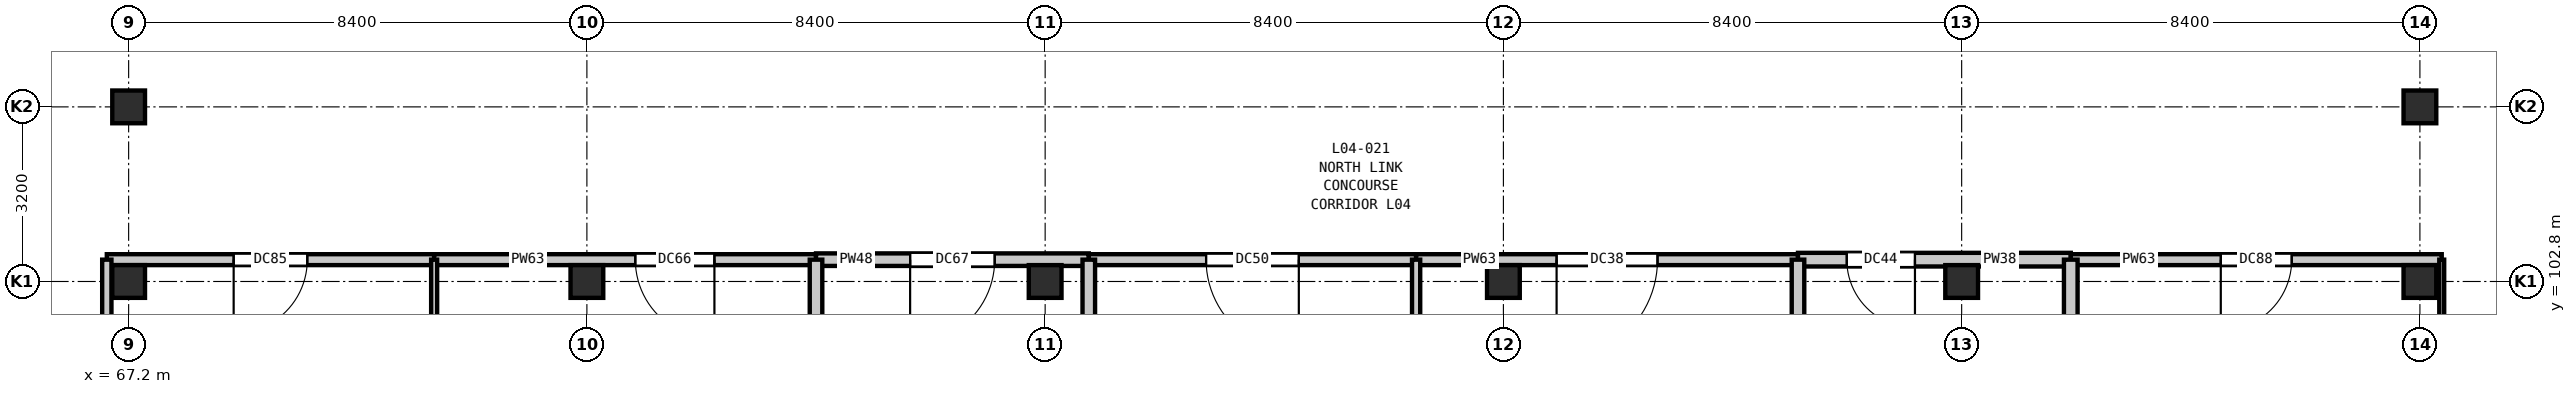
"""IFC4 building model, lengths in metres.
Left out: names, types, materials, properties, quantities, classifications, styles, units other than length and angle.
Written with IfcOpenShell. Run it as: python <this file> out.ifc"""

import sys

from ifc_helpers import new_model, si_unit, direction, frame, frame_2d, origin, origin_2d, place, context, subcontext, project, spatial, rectangle, extrude, element, fill, save


model = new_model("IFC4")
c1 = context("Model", 3, precision=1e-05, world=origin(), true_north=direction((0.0, 1.0)))
c2 = subcontext(c1, "Body", "Model", "MODEL_VIEW")
j1 = project(units=[si_unit("LENGTHUNIT", "METRE"), si_unit("PLANEANGLEUNIT", "RADIAN")], contexts=[c1])
p1 = place(None, origin())
s1 = spatial("IfcSite", under=j1, at=p1, CompositionType="ELEMENT")
p2 = place(p1, origin())
s2 = spatial("IfcBuilding", under=s1, at=p2, CompositionType="ELEMENT")
p3 = place(p2, frame((0.0, 0.0, 20.4)))
s3 = spatial("IfcBuildingStorey", under=s2, at=p3, CompositionType="ELEMENT", Elevation=20.4)
for number, where, z_axis, x_axis in (
    (1, (67.2, 102.8, 0.0), (0.0, 0.0, 1.0), (1.0, 0.0, 0.0)),
    (2, (67.2, 106.0, 0.0), (0.0, 0.0, 1.0), (1.0, 0.0, 0.0)),
    (3, (75.6, 102.8, 0.0), (0.0, 0.0, 1.0), (1.0, 0.0, 0.0)),
    (4, (84.0, 102.8, 0.0), (0.0, 0.0, 1.0), (1.0, 0.0, 0.0)),
    (5, (92.4, 102.8, 0.0), (0.0, 0.0, 1.0), (1.0, 0.0, 0.0)),
    (6, (100.8, 102.8, 0.0), (0.0, 0.0, 1.0), (1.0, 0.0, 0.0)),
    (7, (109.2, 102.8, 0.0), (0.0, 0.0, 1.0), (1.0, 0.0, 0.0)),
    (8, (109.2, 106.0, 0.0), (0.0, 0.0, 1.0), (1.0, 0.0, 0.0)),
):
    element("IfcColumn", number, at=place(p3, frame(where, z_axis=z_axis, x_axis=x_axis)), inside=s3, PredefinedType="COLUMN", context=c2, shape_type="SweptSolid", body=[
        extrude(rectangle(XDim=0.6, YDim=0.6, at=origin_2d()), origin(), (0.0, 0.0, 1.0), 4.2),
    ])
p4 = place(p3, frame((66.8, 103.2, 0.0), z_axis=(0.0, 0.0, 1.0), x_axis=(1.0, 0.0, 0.0)))
e9 = element("IfcWall", 9, at=p4, inside=s3, PredefinedType="PARTITIONING", context=c2, shape_type="SweptSolid", body=[
    extrude(rectangle(XDim=6.0, YDim=0.2, at=frame_2d((3.0, 0.0))), origin(), (0.0, 0.0, 1.0), 3.82),
])
p5 = place(p4, frame((2.325, 0.0, 0.0)))
e10 = element("IfcOpeningElement", 10, at=p5, cuts=e9, PredefinedType="OPENING", context=c2, shape_type="SweptSolid", body=[
    extrude(rectangle(XDim=1.35, YDim=2.2, at=frame_2d((0.675, 1.1))), frame((0.0, 0.11, 0.0), z_axis=(0.0, -1.0, 0.0), x_axis=(1.0, 0.0, 0.0)), (0.0, 0.0, 1.0), 0.22),
])
p6 = place(p3, frame((72.8, 103.2, 0.0), z_axis=(0.0, 0.0, 1.0), x_axis=(1.0, 0.0, 0.0)))
e11 = element("IfcWall", 11, at=p6, inside=s3, PredefinedType="PARTITIONING", context=c2, shape_type="SweptSolid", body=[
    extrude(rectangle(XDim=7.0, YDim=0.2, at=frame_2d((3.5, 0.0))), origin(), (0.0, 0.0, 1.0), 3.82),
])
p7 = place(p6, frame((3.688, 0.0, 0.0)))
e12 = element("IfcOpeningElement", 12, at=p7, cuts=e11, PredefinedType="OPENING", context=c2, shape_type="SweptSolid", body=[
    extrude(rectangle(XDim=1.45, YDim=2.25, at=frame_2d((0.725, 1.125))), frame((0.0, 0.11, 0.0), z_axis=(0.0, -1.0, 0.0), x_axis=(1.0, 0.0, 0.0)), (0.0, 0.0, 1.0), 0.22),
])
p8 = place(p3, frame((79.8, 103.2, 0.0), z_axis=(0.0, 0.0, 1.0), x_axis=(1.0, 0.0, 0.0)))
e13 = element("IfcWall", 13, at=p8, inside=s3, PredefinedType="PARTITIONING", context=c2, shape_type="SweptSolid", body=[
    extrude(rectangle(XDim=5.0, YDim=0.23, at=frame_2d((2.5, 0.0))), origin(), (0.0, 0.0, 1.0), 3.82),
])
p9 = place(p8, frame((1.725, 0.0, 0.0)))
e14 = element("IfcOpeningElement", 14, at=p9, cuts=e13, PredefinedType="OPENING", context=c2, shape_type="SweptSolid", body=[
    extrude(rectangle(XDim=1.55, YDim=2.25, at=frame_2d((0.775, 1.125))), frame((0.0, 0.125, 0.0), z_axis=(0.0, -1.0, 0.0), x_axis=(1.0, 0.0, 0.0)), (0.0, 0.0, 1.0), 0.25),
])
p10 = place(p3, frame((84.8, 103.2, 0.0), z_axis=(0.0, 0.0, 1.0), x_axis=(1.0, 0.0, 0.0)))
e15 = element("IfcWall", 15, at=p10, inside=s3, PredefinedType="PARTITIONING", context=c2, shape_type="SweptSolid", body=[
    extrude(rectangle(XDim=6.0, YDim=0.2, at=frame_2d((3.0, 0.0))), origin(), (0.0, 0.0, 1.0), 3.82),
])
p11 = place(p10, frame((2.15, 0.0, 0.0)))
e16 = element("IfcOpeningElement", 16, at=p11, cuts=e15, PredefinedType="OPENING", context=c2, shape_type="SweptSolid", body=[
    extrude(rectangle(XDim=1.7, YDim=2.3, at=frame_2d((0.85, 1.15))), frame((0.0, 0.11, 0.0), z_axis=(0.0, -1.0, 0.0), x_axis=(1.0, 0.0, 0.0)), (0.0, 0.0, 1.0), 0.22),
])
p12 = place(p3, frame((90.8, 103.2, 0.0), z_axis=(0.0, 0.0, 1.0), x_axis=(1.0, 0.0, 0.0)))
e17 = element("IfcWall", 17, at=p12, inside=s3, PredefinedType="PARTITIONING", context=c2, shape_type="SweptSolid", body=[
    extrude(rectangle(XDim=7.0, YDim=0.2, at=frame_2d((3.5, 0.0))), origin(), (0.0, 0.0, 1.0), 3.82),
])
p13 = place(p12, frame((2.575, 0.0, 0.0)))
e18 = element("IfcOpeningElement", 18, at=p13, cuts=e17, PredefinedType="OPENING", context=c2, shape_type="SweptSolid", body=[
    extrude(rectangle(XDim=1.85, YDim=2.3, at=frame_2d((0.925, 1.15))), frame((0.0, 0.11, 0.0), z_axis=(0.0, -1.0, 0.0), x_axis=(1.0, 0.0, 0.0)), (0.0, 0.0, 1.0), 0.22),
])
p14 = place(p3, frame((97.8, 103.2, 0.0), z_axis=(0.0, 0.0, 1.0), x_axis=(1.0, 0.0, 0.0)))
e19 = element("IfcWall", 19, at=p14, inside=s3, PredefinedType="PARTITIONING", context=c2, shape_type="SweptSolid", body=[
    extrude(rectangle(XDim=5.0, YDim=0.25, at=frame_2d((2.5, 0.0))), origin(), (0.0, 0.0, 1.0), 3.82),
])
p15 = place(p14, frame((0.894, 0.0, 0.0)))
e20 = element("IfcOpeningElement", 20, at=p15, cuts=e19, PredefinedType="OPENING", context=c2, shape_type="SweptSolid", body=[
    extrude(rectangle(XDim=1.25, YDim=2.15, at=frame_2d((0.625, 1.075))), frame((0.0, 0.135, 0.0), z_axis=(0.0, -1.0, 0.0), x_axis=(1.0, 0.0, 0.0)), (0.0, 0.0, 1.0), 0.27),
])
p16 = place(p3, frame((102.8, 103.2, 0.0), z_axis=(0.0, 0.0, 1.0), x_axis=(1.0, 0.0, 0.0)))
e21 = element("IfcWall", 21, at=p16, inside=s3, PredefinedType="PARTITIONING", context=c2, shape_type="SweptSolid", body=[
    extrude(rectangle(XDim=6.8, YDim=0.2, at=frame_2d((3.4, 0.0))), origin(), (0.0, 0.0, 1.0), 3.82),
])
p17 = place(p16, frame((2.75, 0.0, 0.0)))
e22 = element("IfcOpeningElement", 22, at=p17, cuts=e21, PredefinedType="OPENING", context=c2, shape_type="SweptSolid", body=[
    extrude(rectangle(XDim=1.3, YDim=2.2, at=frame_2d((0.65, 1.1))), frame((0.0, 0.11, 0.0), z_axis=(0.0, -1.0, 0.0), x_axis=(1.0, 0.0, 0.0)), (0.0, 0.0, 1.0), 0.22),
])
p18 = place(p3, frame((66.8, 99.6, 0.0), z_axis=(0.0, 0.0, 1.0), x_axis=(0.0, 1.0, 0.0)))
e23 = element("IfcWall", 23, at=p18, inside=s3, PredefinedType="PARTITIONING", context=c2, shape_type="SweptSolid", body=[
    extrude(rectangle(XDim=3.6, YDim=0.17, at=frame_2d((1.8, 0.0))), origin(), (0.0, 0.0, 1.0), 3.82),
])
p19 = place(p3, frame((72.8, 99.6, 0.0), z_axis=(0.0, 0.0, 1.0), x_axis=(0.0, 1.0, 0.0)))
e24 = element("IfcWall", 24, at=p19, inside=s3, PredefinedType="PARTITIONING", context=c2, shape_type="SweptSolid", body=[
    extrude(rectangle(XDim=3.6, YDim=0.11, at=frame_2d((1.8, 0.0))), origin(), (0.0, 0.0, 1.0), 3.82),
])
for number, where, z_axis, x_axis in (
    (25, (79.8, 99.6, 0.0), (0.0, 0.0, 1.0), (0.0, 1.0, 0.0)),
    (26, (84.8, 99.6, 0.0), (0.0, 0.0, 1.0), (0.0, 1.0, 0.0)),
):
    element("IfcWall", number, at=place(p3, frame(where, z_axis=z_axis, x_axis=x_axis)), inside=s3, PredefinedType="PARTITIONING", context=c2, shape_type="SweptSolid", body=[
        extrude(rectangle(XDim=3.6, YDim=0.23, at=frame_2d((1.8, 0.0))), origin(), (0.0, 0.0, 1.0), 3.82),
    ])
p20 = place(p3, frame((90.8, 99.6, 0.0), z_axis=(0.0, 0.0, 1.0), x_axis=(0.0, 1.0, 0.0)))
e27 = element("IfcWall", 27, at=p20, inside=s3, PredefinedType="PARTITIONING", context=c2, shape_type="SweptSolid", body=[
    extrude(rectangle(XDim=3.6, YDim=0.15, at=frame_2d((1.8, 0.0))), origin(), (0.0, 0.0, 1.0), 3.82),
])
p21 = place(p3, frame((97.8, 99.6, 0.0), z_axis=(0.0, 0.0, 1.0), x_axis=(0.0, 1.0, 0.0)))
e28 = element("IfcWall", 28, at=p21, inside=s3, PredefinedType="PARTITIONING", context=c2, shape_type="SweptSolid", body=[
    extrude(rectangle(XDim=3.6, YDim=0.23, at=frame_2d((1.8, 0.0))), origin(), (0.0, 0.0, 1.0), 3.82),
])
p22 = place(p3, frame((102.8, 99.6, 0.0), z_axis=(0.0, 0.0, 1.0), x_axis=(0.0, 1.0, 0.0)))
e29 = element("IfcWall", 29, at=p22, inside=s3, PredefinedType="PARTITIONING", context=c2, shape_type="SweptSolid", body=[
    extrude(rectangle(XDim=3.6, YDim=0.25, at=frame_2d((1.8, 0.0))), origin(), (0.0, 0.0, 1.0), 3.82),
])
p23 = place(p3, frame((109.6, 99.6, 0.0), z_axis=(0.0, 0.0, 1.0), x_axis=(0.0, 1.0, 0.0)))
e30 = element("IfcWall", 30, at=p23, inside=s3, PredefinedType="PARTITIONING", context=c2, shape_type="SweptSolid", body=[
    extrude(rectangle(XDim=3.6, YDim=0.09, at=frame_2d((1.8, 0.0))), origin(), (0.0, 0.0, 1.0), 3.82),
])
p24 = place(p5, frame((1.35, 0.0, 0.0), z_axis=(0.0, 0.0, 1.0), x_axis=(-1.0, 0.0, 0.0)))
e31 = element("IfcDoor", 31, at=p24, inside=s3, OperationType="SINGLE_SWING_RIGHT", PredefinedType="DOOR", context=c2, shape_type="SweptSolid", body=[
    extrude(rectangle(XDim=1.35, YDim=2.2, at=frame_2d((0.675, 1.1))), frame((0.0, 0.025, 0.0), z_axis=(0.0, -1.0, 0.0), x_axis=(1.0, 0.0, 0.0)), (0.0, 0.0, 1.0), 0.05),
])
fill(e10, e31)
p25 = place(p7, frame((1.45, 0.0, 0.0), z_axis=(0.0, 0.0, 1.0), x_axis=(-1.0, 0.0, 0.0)))
e32 = element("IfcDoor", 32, at=p25, inside=s3, OperationType="SINGLE_SWING_LEFT", PredefinedType="DOOR", context=c2, shape_type="SweptSolid", body=[
    extrude(rectangle(XDim=1.45, YDim=2.25, at=frame_2d((0.725, 1.125))), frame((0.0, 0.025, 0.0), z_axis=(0.0, -1.0, 0.0), x_axis=(1.0, 0.0, 0.0)), (0.0, 0.0, 1.0), 0.05),
])
fill(e12, e32)
p26 = place(p9, frame((1.55, 0.0, 0.0), z_axis=(0.0, 0.0, 1.0), x_axis=(-1.0, 0.0, 0.0)))
e33 = element("IfcDoor", 33, at=p26, inside=s3, OperationType="SINGLE_SWING_RIGHT", PredefinedType="DOOR", context=c2, shape_type="SweptSolid", body=[
    extrude(rectangle(XDim=1.55, YDim=2.25, at=frame_2d((0.775, 1.125))), frame((0.0, 0.025, 0.0), z_axis=(0.0, -1.0, 0.0), x_axis=(1.0, 0.0, 0.0)), (0.0, 0.0, 1.0), 0.05),
])
fill(e14, e33)
p27 = place(p11, frame((1.7, 0.0, 0.0), z_axis=(0.0, 0.0, 1.0), x_axis=(-1.0, 0.0, 0.0)))
e34 = element("IfcDoor", 34, at=p27, inside=s3, OperationType="SINGLE_SWING_LEFT", PredefinedType="DOOR", context=c2, shape_type="SweptSolid", body=[
    extrude(rectangle(XDim=1.7, YDim=2.3, at=frame_2d((0.85, 1.15))), frame((0.0, 0.025, 0.0), z_axis=(0.0, -1.0, 0.0), x_axis=(1.0, 0.0, 0.0)), (0.0, 0.0, 1.0), 0.05),
])
fill(e16, e34)
p28 = place(p13, frame((1.85, 0.0, 0.0), z_axis=(0.0, 0.0, 1.0), x_axis=(-1.0, 0.0, 0.0)))
e35 = element("IfcDoor", 35, at=p28, inside=s3, OperationType="SINGLE_SWING_RIGHT", PredefinedType="DOOR", context=c2, shape_type="SweptSolid", body=[
    extrude(rectangle(XDim=1.85, YDim=2.3, at=frame_2d((0.925, 1.15))), frame((0.0, 0.025, 0.0), z_axis=(0.0, -1.0, 0.0), x_axis=(1.0, 0.0, 0.0)), (0.0, 0.0, 1.0), 0.05),
])
fill(e18, e35)
p29 = place(p15, frame((1.25, 0.0, 0.0), z_axis=(0.0, 0.0, 1.0), x_axis=(-1.0, 0.0, 0.0)))
e36 = element("IfcDoor", 36, at=p29, inside=s3, OperationType="SINGLE_SWING_LEFT", PredefinedType="DOOR", context=c2, shape_type="SweptSolid", body=[
    extrude(rectangle(XDim=1.25, YDim=2.15, at=frame_2d((0.625, 1.075))), frame((0.0, 0.025, 0.0), z_axis=(0.0, -1.0, 0.0), x_axis=(1.0, 0.0, 0.0)), (0.0, 0.0, 1.0), 0.05),
])
fill(e20, e36)
p30 = place(p17, frame((1.3, 0.0, 0.0), z_axis=(0.0, 0.0, 1.0), x_axis=(-1.0, 0.0, 0.0)))
e37 = element("IfcDoor", 37, at=p30, inside=s3, OperationType="SINGLE_SWING_RIGHT", PredefinedType="DOOR", context=c2, shape_type="SweptSolid", body=[
    extrude(rectangle(XDim=1.3, YDim=2.2, at=frame_2d((0.65, 1.1))), frame((0.0, 0.025, 0.0), z_axis=(0.0, -1.0, 0.0), x_axis=(1.0, 0.0, 0.0)), (0.0, 0.0, 1.0), 0.05),
])
fill(e22, e37)
save(model, sys.argv[1])
